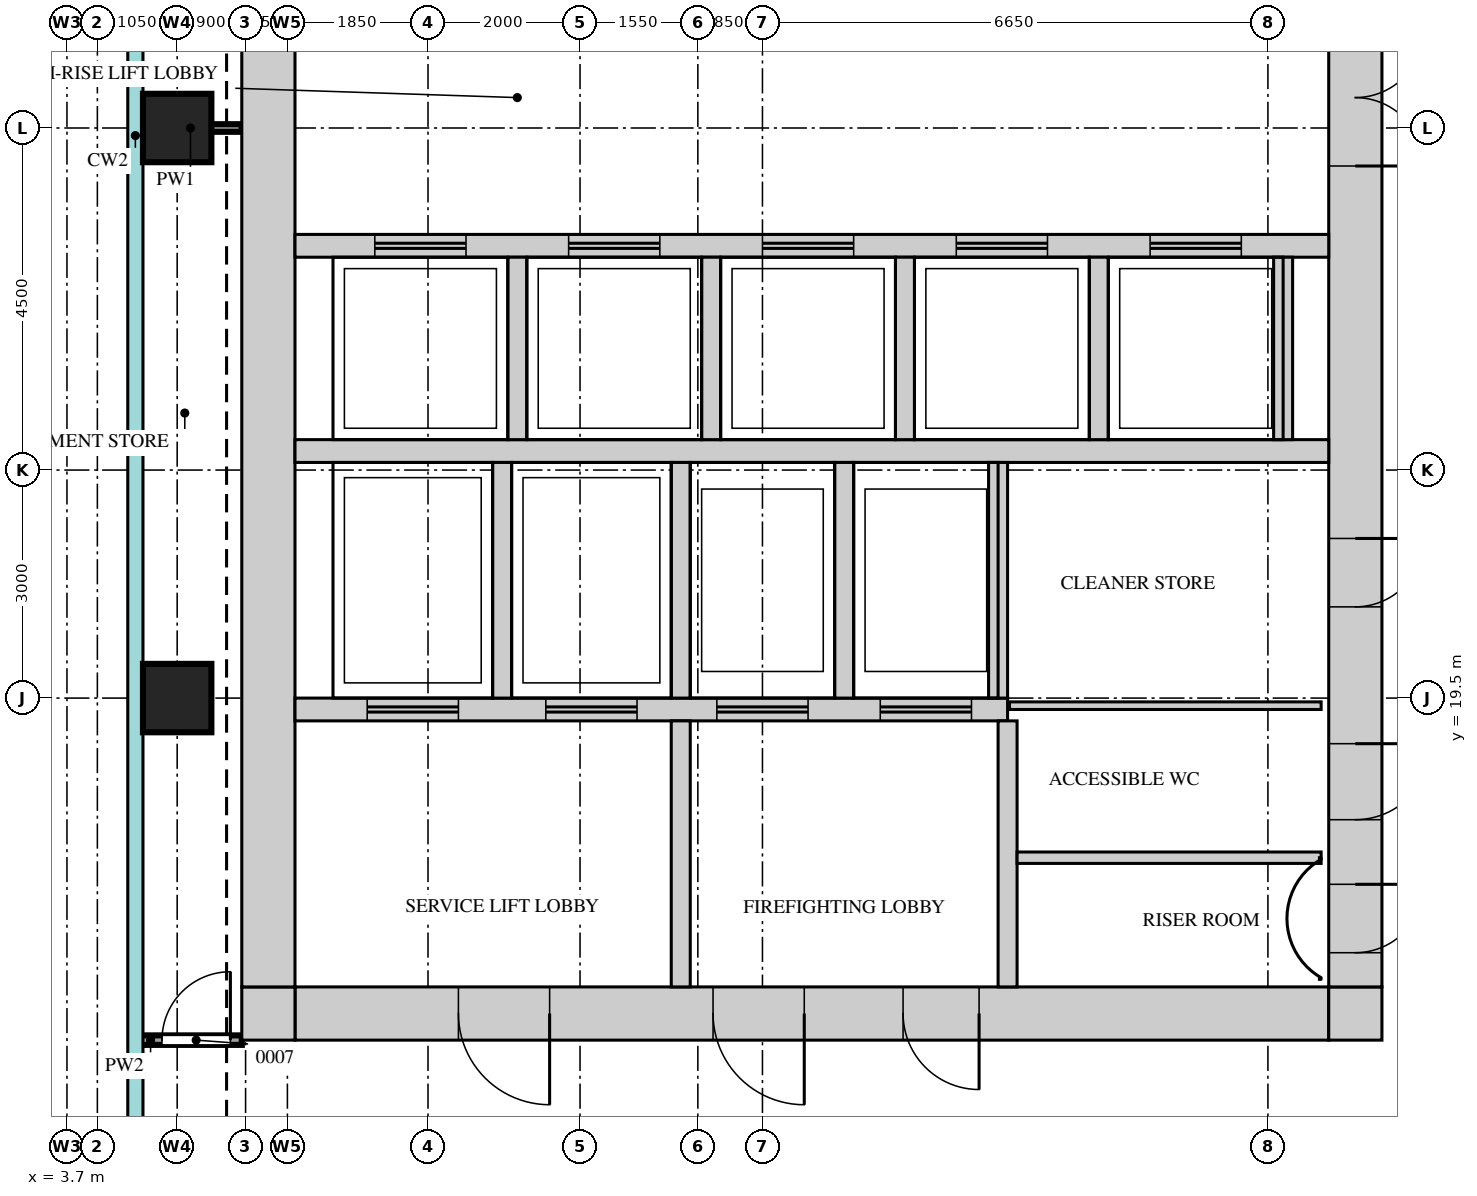
"""IFC4 building model, lengths in metres.
Left out: names, types, materials, properties, quantities, classifications, styles, units other than length and angle.
Written with IfcOpenShell. Run it as: python <this file> out.ifc"""

import sys

from ifc_helpers import new_model, si_unit, direction, frame, frame_2d, origin, origin_2d, place, context, subcontext, project, spatial, rectangle, extrude, source, transform, mapped, element, fill, save


model = new_model("IFC4")
c1 = context("Model", 3, precision=1e-05, world=origin(), true_north=direction((0.0, 1.0)))
c2 = subcontext(c1, "Body", "Model", "MODEL_VIEW")
j1 = project(units=[si_unit("LENGTHUNIT", "METRE"), si_unit("PLANEANGLEUNIT", "RADIAN")], contexts=[c1])
p1 = place(None, origin())
s1 = spatial("IfcSite", under=j1, at=p1, CompositionType="ELEMENT")
p2 = place(p1, origin())
s2 = spatial("IfcBuilding", under=s1, at=p2, CompositionType="ELEMENT")
p3 = place(p2, frame((0.0, 0.0, 238.2)))
s3 = spatial("IfcBuildingStorey", under=s2, at=p3, CompositionType="ELEMENT", Elevation=238.2)
m1 = source(origin(), c2, "Body", "SweptSolid", [
    extrude(rectangle(XDim=13.6, YDim=0.7, at=frame_2d((6.8, 0.0))), origin(), (0.0, 0.0, 1.0), 3.75),
])
p4 = place(p3, frame((6.7, 15.35, 0.0), z_axis=(0.0, 0.0, 1.0), x_axis=(1.0, 0.0, 0.0)))
e1 = element("IfcWall", 1, at=p4, inside=s3, PredefinedType="SHEAR", context=c2, shape_type="MappedRepresentation", body=[
    mapped(m1, transform((0.0, 0.0, 0.0))),
])
m2 = source(origin(), c2, "Body", "SweptSolid", [
    extrude(rectangle(XDim=1.2, YDim=2.1, at=frame_2d((0.6, 1.05))), frame((0.0, 0.36, 0.0), z_axis=(0.0, -1.0, 0.0), x_axis=(1.0, 0.0, 0.0)), (0.0, 0.0, 1.0), 0.72),
])
p5 = place(p4, frame((5.5, 0.0, 0.0)))
e2 = element("IfcOpeningElement", 2, at=p5, cuts=e1, PredefinedType="OPENING", context=c2, shape_type="MappedRepresentation", body=[
    mapped(m2, transform((0.0, 0.0, 0.0))),
])
p6 = place(p4, frame((2.15, 0.0, 0.0)))
e3 = element("IfcOpeningElement", 3, at=p6, cuts=e1, PredefinedType="OPENING", context=c2, shape_type="MappedRepresentation", body=[
    mapped(m2, transform((0.0, 0.0, 0.0))),
])
m3 = source(origin(), c2, "Body", "SweptSolid", [
    extrude(rectangle(XDim=1.0, YDim=2.1, at=frame_2d((0.5, 1.05))), frame((0.0, 0.36, 0.0), z_axis=(0.0, -1.0, 0.0), x_axis=(1.0, 0.0, 0.0)), (0.0, 0.0, 1.0), 0.72),
])
p7 = place(p4, frame((8.0, 0.0, 0.0)))
e4 = element("IfcOpeningElement", 4, at=p7, cuts=e1, PredefinedType="OPENING", context=c2, shape_type="MappedRepresentation", body=[
    mapped(m3, transform((0.0, 0.0, 0.0))),
])
m4 = source(origin(), c2, "Body", "SweptSolid", [
    extrude(rectangle(XDim=0.7, YDim=0.7, at=frame_2d((0.35, 0.0))), origin(), (0.0, 0.0, 1.0), 3.75),
])
for number, where, z_axis, x_axis in (
    (5, (20.3, 15.35, 0.0), (0.0, 0.0, 1.0), (1.0, 0.0, 0.0)),
    (6, (6.0, 15.35, 0.0), (0.0, 0.0, 1.0), (1.0, 0.0, 0.0)),
):
    element("IfcWall", number, at=place(p3, frame(where, z_axis=z_axis, x_axis=x_axis)), inside=s3, PredefinedType="SHEAR", context=c2, shape_type="MappedRepresentation", body=[
        mapped(m4, transform((0.0, 0.0, 0.0))),
    ])
m5 = source(origin(), c2, "Body", "SweptSolid", [
    extrude(rectangle(XDim=22.6, YDim=0.7, at=frame_2d((11.3, 0.0))), origin(), (0.0, 0.0, 1.0), 3.75),
])
p8 = place(p3, frame((20.65, 15.7, 0.0), z_axis=(0.0, 0.0, 1.0), x_axis=(0.0, 1.0, 0.0)))
e7 = element("IfcWall", 7, at=p8, inside=s3, PredefinedType="SHEAR", context=c2, shape_type="MappedRepresentation", body=[
    mapped(m5, transform((0.0, 0.0, 0.0))),
])
m6 = source(origin(), c2, "Body", "SweptSolid", [
    extrude(rectangle(XDim=1.8, YDim=2.1, at=frame_2d((0.9, 1.05))), frame((0.0, 0.36, 0.0), z_axis=(0.0, -1.0, 0.0), x_axis=(1.0, 0.0, 0.0)), (0.0, 0.0, 1.0), 0.72),
])
p9 = place(p8, frame((10.8, 0.0, 0.0)))
e8 = element("IfcOpeningElement", 8, at=p9, cuts=e7, PredefinedType="OPENING", context=c2, shape_type="MappedRepresentation", body=[
    mapped(m6, transform((0.0, 0.0, 0.0))),
])
m7 = source(origin(), c2, "Body", "SweptSolid", [
    extrude(rectangle(XDim=0.9, YDim=2.1, at=frame_2d((0.45, 1.05))), frame((0.0, 0.36, 0.0), z_axis=(0.0, -1.0, 0.0), x_axis=(1.0, 0.0, 0.0)), (0.0, 0.0, 1.0), 0.72),
])
p10 = place(p8, frame((0.45, 0.0, 0.0)))
e9 = element("IfcOpeningElement", 9, at=p10, cuts=e7, PredefinedType="OPENING", context=c2, shape_type="MappedRepresentation", body=[
    mapped(m7, transform((0.0, 0.0, 0.0))),
])
p11 = place(p8, frame((2.2, 0.0, 0.0)))
e10 = element("IfcOpeningElement", 10, at=p11, cuts=e7, PredefinedType="OPENING", context=c2, shape_type="MappedRepresentation", body=[
    mapped(m3, transform((0.0, 0.0, 0.0))),
])
p12 = place(p8, frame((5.0, 0.0, 0.0)))
e11 = element("IfcOpeningElement", 11, at=p12, cuts=e7, PredefinedType="OPENING", context=c2, shape_type="MappedRepresentation", body=[
    mapped(m7, transform((0.0, 0.0, 0.0))),
])
p13 = place(p3, frame((6.35, 15.7, 0.0), z_axis=(0.0, 0.0, 1.0), x_axis=(0.0, 1.0, 0.0)))
e12 = element("IfcWall", 12, at=p13, inside=s3, PredefinedType="SHEAR", context=c2, shape_type="MappedRepresentation", body=[
    mapped(m5, transform((0.0, 0.0, 0.0))),
])
m8 = source(origin(), c2, "Body", "SweptSolid", [
    extrude(rectangle(XDim=13.6, YDim=0.3, at=frame_2d((6.8, 0.0))), origin(), (0.0, 0.0, 1.0), 3.75),
])
p14 = place(p3, frame((6.7, 22.75, 0.0), z_axis=(0.0, 0.0, 1.0), x_axis=(1.0, 0.0, 0.0)))
e13 = element("IfcWall", 13, at=p14, inside=s3, PredefinedType="STANDARD", context=c2, shape_type="MappedRepresentation", body=[
    mapped(m8, transform((0.0, 0.0, 0.0))),
])
m9 = source(origin(), c2, "Body", "SweptSolid", [
    extrude(rectangle(XDim=9.375, YDim=0.3, at=frame_2d((4.688, 0.0))), origin(), (0.0, 0.0, 1.0), 3.75),
])
p15 = place(p3, frame((6.7, 19.35, 0.0), z_axis=(0.0, 0.0, 1.0), x_axis=(1.0, 0.0, 0.0)))
e14 = element("IfcWall", 14, at=p15, inside=s3, PredefinedType="STANDARD", context=c2, shape_type="MappedRepresentation", body=[
    mapped(m9, transform((0.0, 0.0, 0.0))),
])
m10 = source(origin(), c2, "Body", "SweptSolid", [
    extrude(rectangle(XDim=1.2, YDim=2.1, at=frame_2d((0.6, 1.05))), frame((0.0, 0.16, 0.0), z_axis=(0.0, -1.0, 0.0), x_axis=(1.0, 0.0, 0.0)), (0.0, 0.0, 1.0), 0.32),
])
p16 = place(p15, frame((0.95, 0.0, 0.0)))
e15 = element("IfcOpeningElement", 15, at=p16, cuts=e14, PredefinedType="OPENING", context=c2, shape_type="MappedRepresentation", body=[
    mapped(m10, transform((0.0, 0.0, 0.0))),
])
p17 = place(p15, frame((3.3, 0.0, 0.0)))
e16 = element("IfcOpeningElement", 16, at=p17, cuts=e14, PredefinedType="OPENING", context=c2, shape_type="MappedRepresentation", body=[
    mapped(m10, transform((0.0, 0.0, 0.0))),
])
p18 = place(p15, frame((5.55, 0.0, 0.0)))
e17 = element("IfcOpeningElement", 17, at=p18, cuts=e14, PredefinedType="OPENING", context=c2, shape_type="MappedRepresentation", body=[
    mapped(m10, transform((0.0, 0.0, 0.0))),
])
p19 = place(p15, frame((7.7, 0.0, 0.0)))
e18 = element("IfcOpeningElement", 18, at=p19, cuts=e14, PredefinedType="OPENING", context=c2, shape_type="MappedRepresentation", body=[
    mapped(m10, transform((0.0, 0.0, 0.0))),
])
p20 = place(p3, frame((6.7, 25.45, 0.0), z_axis=(0.0, 0.0, 1.0), x_axis=(1.0, 0.0, 0.0)))
e19 = element("IfcWall", 19, at=p20, inside=s3, PredefinedType="STANDARD", context=c2, shape_type="MappedRepresentation", body=[
    mapped(m8, transform((0.0, 0.0, 0.0))),
])
p21 = place(p20, frame((1.05, 0.0, 0.0)))
e20 = element("IfcOpeningElement", 20, at=p21, cuts=e19, PredefinedType="OPENING", context=c2, shape_type="MappedRepresentation", body=[
    mapped(m10, transform((0.0, 0.0, 0.0))),
])
p22 = place(p20, frame((3.6, 0.0, 0.0)))
e21 = element("IfcOpeningElement", 21, at=p22, cuts=e19, PredefinedType="OPENING", context=c2, shape_type="MappedRepresentation", body=[
    mapped(m10, transform((0.0, 0.0, 0.0))),
])
p23 = place(p20, frame((6.15, 0.0, 0.0)))
e22 = element("IfcOpeningElement", 22, at=p23, cuts=e19, PredefinedType="OPENING", context=c2, shape_type="MappedRepresentation", body=[
    mapped(m10, transform((0.0, 0.0, 0.0))),
])
p24 = place(p20, frame((8.7, 0.0, 0.0)))
e23 = element("IfcOpeningElement", 23, at=p24, cuts=e19, PredefinedType="OPENING", context=c2, shape_type="MappedRepresentation", body=[
    mapped(m10, transform((0.0, 0.0, 0.0))),
])
p25 = place(p20, frame((11.25, 0.0, 0.0)))
e24 = element("IfcOpeningElement", 24, at=p25, cuts=e19, PredefinedType="OPENING", context=c2, shape_type="MappedRepresentation", body=[
    mapped(m10, transform((0.0, 0.0, 0.0))),
])
m11 = source(origin(), c2, "Body", "SweptSolid", [
    extrude(rectangle(XDim=3.1, YDim=0.25, at=frame_2d((1.55, 0.0))), origin(), (0.0, 0.0, 1.0), 3.75),
])
for number, where, z_axis, x_axis in (
    (25, (9.425, 19.5, 0.0), (0.0, 0.0, 1.0), (0.0, 1.0, 0.0)),
    (26, (11.775, 19.5, 0.0), (0.0, 0.0, 1.0), (0.0, 1.0, 0.0)),
    (27, (13.925, 19.5, 0.0), (0.0, 0.0, 1.0), (0.0, 1.0, 0.0)),
    (28, (15.95, 19.5, 0.0), (0.0, 0.0, 1.0), (0.0, 1.0, 0.0)),
):
    element("IfcWall", number, at=place(p3, frame(where, z_axis=z_axis, x_axis=x_axis)), inside=s3, PredefinedType="STANDARD", context=c2, shape_type="MappedRepresentation", body=[
        mapped(m11, transform((0.0, 0.0, 0.0))),
    ])
m12 = source(origin(), c2, "Body", "SweptSolid", [
    extrude(rectangle(XDim=2.4, YDim=0.25, at=frame_2d((1.2, 0.0))), origin(), (0.0, 0.0, 1.0), 3.75),
])
for number, where, z_axis, x_axis in (
    (29, (17.275, 22.9, 0.0), (0.0, 0.0, 1.0), (0.0, 1.0, 0.0)),
    (30, (19.7, 22.9, 0.0), (0.0, 0.0, 1.0), (0.0, 1.0, 0.0)),
    (31, (9.625, 22.9, 0.0), (0.0, 0.0, 1.0), (0.0, 1.0, 0.0)),
    (32, (12.175, 22.9, 0.0), (0.0, 0.0, 1.0), (0.0, 1.0, 0.0)),
    (33, (14.725, 22.9, 0.0), (0.0, 0.0, 1.0), (0.0, 1.0, 0.0)),
):
    element("IfcWall", number, at=place(p3, frame(where, z_axis=z_axis, x_axis=x_axis)), inside=s3, PredefinedType="STANDARD", context=c2, shape_type="MappedRepresentation", body=[
        mapped(m12, transform((0.0, 0.0, 0.0))),
    ])
m13 = source(origin(), c2, "Body", "SweptSolid", [
    extrude(rectangle(XDim=3.5, YDim=0.25, at=frame_2d((1.75, 0.0))), origin(), (0.0, 0.0, 1.0), 3.75),
])
for number, where, z_axis, x_axis in (
    (34, (16.075, 15.7, 0.0), (0.0, 0.0, 1.0), (0.0, 1.0, 0.0)),
    (35, (11.775, 15.7, 0.0), (0.0, 0.0, 1.0), (0.0, 1.0, 0.0)),
):
    element("IfcWall", number, at=place(p3, frame(where, z_axis=z_axis, x_axis=x_axis)), inside=s3, PredefinedType="STANDARD", context=c2, shape_type="MappedRepresentation", body=[
        mapped(m13, transform((0.0, 0.0, 0.0))),
    ])
m14 = source(origin(), c2, "Body", "SweptSolid", [
    extrude(rectangle(XDim=0.9, YDim=0.9, at=origin_2d()), origin(), (0.0, 0.0, 1.0), 3.75),
])
for number, where, z_axis, x_axis in (
    (36, (5.15, 19.5, 0.0), (0.0, 0.0, 1.0), (1.0, 0.0, 0.0)),
    (37, (5.15, 27.0, 0.0), (0.0, 0.0, 1.0), (1.0, 0.0, 0.0)),
):
    element("IfcColumn", number, at=place(p3, frame(where, z_axis=z_axis, x_axis=x_axis)), inside=s3, PredefinedType="COLUMN", context=c2, shape_type="MappedRepresentation", body=[
        mapped(m14, transform((0.0, 0.0, 0.0))),
    ])
m15 = source(origin(), c2, "Body", "SweptSolid", [
    extrude(rectangle(XDim=1.35, YDim=0.125, at=frame_2d((0.675, 0.0))), origin(), (0.0, 0.0, 1.0), 3.8),
])
p26 = place(p3, frame((4.65, 15.0, 0.0), z_axis=(0.0, 0.0, 1.0), x_axis=(1.0, 0.0, 0.0)))
e38 = element("IfcWall", 38, at=p26, inside=s3, PredefinedType="PARTITIONING", context=c2, shape_type="MappedRepresentation", body=[
    mapped(m15, transform((0.0, 0.0, 0.0))),
])
m16 = source(origin(), c2, "Body", "SweptSolid", [
    extrude(rectangle(XDim=0.9, YDim=2.1, at=frame_2d((0.45, 1.05))), frame((0.0, 0.073, 0.0), z_axis=(0.0, -1.0, 0.0), x_axis=(1.0, 0.0, 0.0)), (0.0, 0.0, 1.0), 0.145),
])
p27 = place(p26, frame((0.3, 0.0, 0.0)))
e39 = element("IfcOpeningElement", 39, at=p27, cuts=e38, PredefinedType="OPENING", context=c2, shape_type="MappedRepresentation", body=[
    mapped(m16, transform((0.0, 0.0, 0.0))),
])
m17 = source(origin(), c2, "Body", "SweptSolid", [
    extrude(rectangle(XDim=4.0, YDim=0.15, at=frame_2d((2.0, 0.0))), origin(), (0.0, 0.0, 1.0), 3.8),
])
p28 = place(p3, frame((16.2, 17.4, 0.0), z_axis=(0.0, 0.0, 1.0), x_axis=(1.0, 0.0, 0.0)))
e40 = element("IfcWall", 40, at=p28, inside=s3, PredefinedType="PARTITIONING", context=c2, shape_type="MappedRepresentation", body=[
    mapped(m17, transform((0.0, 0.0, 0.0))),
])
m18 = source(origin(), c2, "Body", "SweptSolid", [
    extrude(rectangle(XDim=4.1, YDim=0.1, at=frame_2d((2.05, 0.0))), origin(), (0.0, 0.0, 1.0), 3.8),
])
p29 = place(p3, frame((16.1, 19.4, 0.0), z_axis=(0.0, 0.0, 1.0), x_axis=(1.0, 0.0, 0.0)))
e41 = element("IfcWall", 41, at=p29, inside=s3, PredefinedType="PARTITIONING", context=c2, shape_type="MappedRepresentation", body=[
    mapped(m18, transform((0.0, 0.0, 0.0))),
])
m19 = source(origin(), c2, "Body", "SweptSolid", [
    extrude(rectangle(XDim=1.35, YDim=0.1, at=frame_2d((0.675, 0.0))), origin(), (0.0, 0.0, 1.0), 3.8),
])
p30 = place(p3, frame((4.65, 27.0, 0.0), z_axis=(0.0, 0.0, 1.0), x_axis=(1.0, 0.0, 0.0)))
e42 = element("IfcWall", 42, at=p30, inside=s3, PredefinedType="PARTITIONING", context=c2, shape_type="MappedRepresentation", body=[
    mapped(m19, transform((0.0, 0.0, 0.0))),
])
m20 = source(origin(), c2, "Body", "SweptSolid", [
    extrude(rectangle(XDim=1.8, YDim=2.1, at=frame_2d((0.9, 1.05))), frame((0.0, 0.3, 0.0), z_axis=(0.0, -1.0, 0.0), x_axis=(1.0, 0.0, 0.0)), (0.0, 0.0, 1.0), 0.6),
])
p31 = place(p9, origin())
e43 = element("IfcDoor", 43, at=p31, inside=s3, OperationType="DOUBLE_DOOR_SINGLE_SWING", PredefinedType="DOOR", context=c2, shape_type="MappedRepresentation", body=[
    mapped(m20, transform((0.0, 0.0, 0.0))),
])
fill(e8, e43)
m21 = source(origin(), c2, "Body", "SweptSolid", [
    extrude(rectangle(XDim=0.9, YDim=2.1, at=frame_2d((0.45, 1.05))), frame((0.0, 0.3, 0.0), z_axis=(0.0, -1.0, 0.0), x_axis=(1.0, 0.0, 0.0)), (0.0, 0.0, 1.0), 0.6),
])
p32 = place(p10, origin())
e44 = element("IfcDoor", 44, at=p32, inside=s3, OperationType="SINGLE_SWING_RIGHT", PredefinedType="DOOR", context=c2, shape_type="MappedRepresentation", body=[
    mapped(m21, transform((0.0, 0.0, 0.0))),
])
fill(e9, e44)
m22 = source(origin(), c2, "Body", "SweptSolid", [
    extrude(rectangle(XDim=1.0, YDim=2.1, at=frame_2d((0.5, 1.05))), frame((0.0, 0.3, 0.0), z_axis=(0.0, -1.0, 0.0), x_axis=(1.0, 0.0, 0.0)), (0.0, 0.0, 1.0), 0.6),
])
p33 = place(p11, origin())
e45 = element("IfcDoor", 45, at=p33, inside=s3, OperationType="SINGLE_SWING_RIGHT", PredefinedType="DOOR", context=c2, shape_type="MappedRepresentation", body=[
    mapped(m22, transform((0.0, 0.0, 0.0))),
])
fill(e10, e45)
p34 = place(p12, origin())
e46 = element("IfcDoor", 46, at=p34, inside=s3, OperationType="SINGLE_SWING_RIGHT", PredefinedType="DOOR", context=c2, shape_type="MappedRepresentation", body=[
    mapped(m21, transform((0.0, 0.0, 0.0))),
])
fill(e11, e46)
m23 = source(origin(), c2, "Body", "SweptSolid", [
    extrude(rectangle(XDim=1.2, YDim=2.1, at=frame_2d((0.6, 1.05))), frame((0.0, 0.3, 0.0), z_axis=(0.0, -1.0, 0.0), x_axis=(1.0, 0.0, 0.0)), (0.0, 0.0, 1.0), 0.6),
])
p35 = place(p5, origin())
e47 = element("IfcDoor", 47, at=p35, inside=s3, OperationType="SINGLE_SWING_RIGHT", PredefinedType="DOOR", context=c2, shape_type="MappedRepresentation", body=[
    mapped(m23, transform((0.0, 0.0, 0.0))),
])
fill(e2, e47)
p36 = place(p6, origin())
e48 = element("IfcDoor", 48, at=p36, inside=s3, OperationType="SINGLE_SWING_RIGHT", PredefinedType="DOOR", context=c2, shape_type="MappedRepresentation", body=[
    mapped(m23, transform((0.0, 0.0, 0.0))),
])
fill(e3, e48)
p37 = place(p7, origin())
e49 = element("IfcDoor", 49, at=p37, inside=s3, OperationType="SINGLE_SWING_RIGHT", PredefinedType="DOOR", context=c2, shape_type="MappedRepresentation", body=[
    mapped(m22, transform((0.0, 0.0, 0.0))),
])
fill(e4, e49)
m24 = source(origin(), c2, "Body", "SweptSolid", [
    extrude(rectangle(XDim=0.9, YDim=2.1, at=frame_2d((0.45, 1.05))), frame((0.0, 0.025, 0.0), z_axis=(0.0, -1.0, 0.0), x_axis=(1.0, 0.0, 0.0)), (0.0, 0.0, 1.0), 0.05),
])
p38 = place(p27, origin())
e50 = element("IfcDoor", 50, at=p38, inside=s3, OperationType="SINGLE_SWING_LEFT", PredefinedType="DOOR", context=c2, shape_type="MappedRepresentation", body=[
    mapped(m24, transform((0.0, 0.0, 0.0))),
])
fill(e39, e50)
m25 = source(origin(), c2, "Body", "SweptSolid", [
    extrude(rectangle(XDim=1.2, YDim=2.1, at=frame_2d((0.6, 1.05))), frame((0.0, 0.025, 0.0), z_axis=(0.0, -1.0, 0.0), x_axis=(1.0, 0.0, 0.0)), (0.0, 0.0, 1.0), 0.05),
])
p39 = place(p21, origin())
e51 = element("IfcDoor", 51, at=p39, inside=s3, OperationType="DOUBLE_DOOR_SLIDING", PredefinedType="DOOR", context=c2, shape_type="MappedRepresentation", body=[
    mapped(m25, transform((0.0, 0.0, 0.0))),
])
fill(e20, e51)
p40 = place(p22, origin())
e52 = element("IfcDoor", 52, at=p40, inside=s3, OperationType="DOUBLE_DOOR_SLIDING", PredefinedType="DOOR", context=c2, shape_type="MappedRepresentation", body=[
    mapped(m25, transform((0.0, 0.0, 0.0))),
])
fill(e21, e52)
p41 = place(p23, origin())
e53 = element("IfcDoor", 53, at=p41, inside=s3, OperationType="DOUBLE_DOOR_SLIDING", PredefinedType="DOOR", context=c2, shape_type="MappedRepresentation", body=[
    mapped(m25, transform((0.0, 0.0, 0.0))),
])
fill(e22, e53)
p42 = place(p24, origin())
e54 = element("IfcDoor", 54, at=p42, inside=s3, OperationType="DOUBLE_DOOR_SLIDING", PredefinedType="DOOR", context=c2, shape_type="MappedRepresentation", body=[
    mapped(m25, transform((0.0, 0.0, 0.0))),
])
fill(e23, e54)
p43 = place(p25, origin())
e55 = element("IfcDoor", 55, at=p43, inside=s3, OperationType="DOUBLE_DOOR_SLIDING", PredefinedType="DOOR", context=c2, shape_type="MappedRepresentation", body=[
    mapped(m25, transform((0.0, 0.0, 0.0))),
])
fill(e24, e55)
p44 = place(p16, origin())
e56 = element("IfcDoor", 56, at=p44, inside=s3, OperationType="DOUBLE_DOOR_SLIDING", PredefinedType="DOOR", context=c2, shape_type="MappedRepresentation", body=[
    mapped(m25, transform((0.0, 0.0, 0.0))),
])
fill(e15, e56)
p45 = place(p17, origin())
e57 = element("IfcDoor", 57, at=p45, inside=s3, OperationType="DOUBLE_DOOR_SLIDING", PredefinedType="DOOR", context=c2, shape_type="MappedRepresentation", body=[
    mapped(m25, transform((0.0, 0.0, 0.0))),
])
fill(e16, e57)
p46 = place(p18, origin())
e58 = element("IfcDoor", 58, at=p46, inside=s3, OperationType="DOUBLE_DOOR_SLIDING", PredefinedType="DOOR", context=c2, shape_type="MappedRepresentation", body=[
    mapped(m25, transform((0.0, 0.0, 0.0))),
])
fill(e17, e58)
p47 = place(p19, origin())
e59 = element("IfcDoor", 59, at=p47, inside=s3, OperationType="DOUBLE_DOOR_SLIDING", PredefinedType="DOOR", context=c2, shape_type="MappedRepresentation", body=[
    mapped(m25, transform((0.0, 0.0, 0.0))),
])
fill(e18, e59)
save(model, sys.argv[1])
